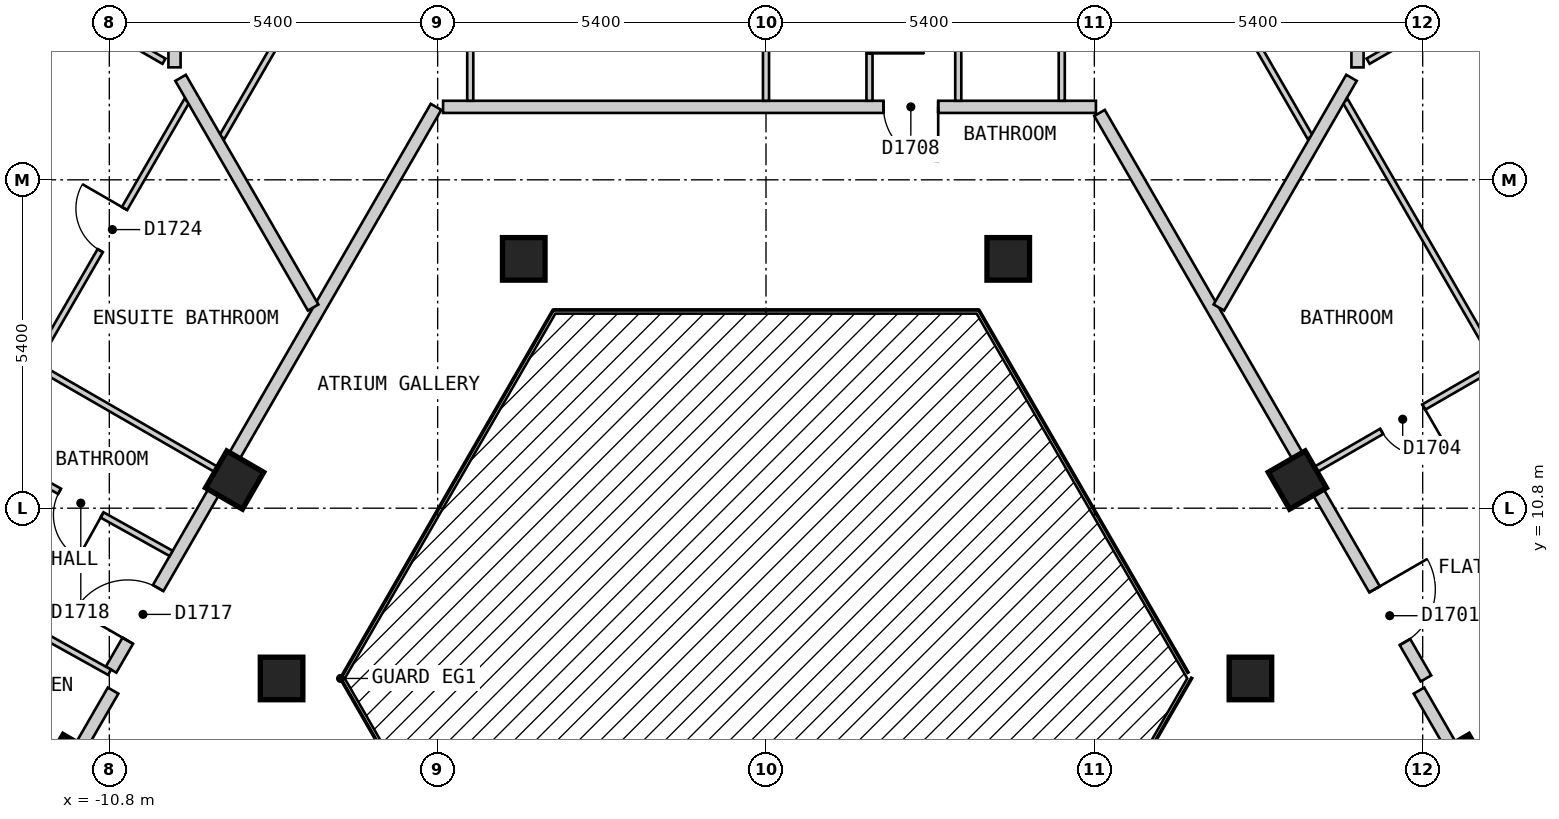
"""IFC4 building model, lengths in metres.
Left out: names, types, materials, properties, quantities, classifications, styles, units other than length and angle.
Written with IfcOpenShell. Run it as: python <this file> out.ifc"""

import sys

from ifc_helpers import new_model, si_unit, direction, frame, frame_2d, origin, origin_2d, place, context, subcontext, project, spatial, rectangle, extrude, element, fill, save


model = new_model("IFC4")
c1 = context("Model", 3, precision=1e-05, world=origin(), true_north=direction((0.0, 1.0)))
c2 = subcontext(c1, "Body", "Model", "MODEL_VIEW")
j1 = project(units=[si_unit("LENGTHUNIT", "METRE"), si_unit("PLANEANGLEUNIT", "RADIAN")], contexts=[c1])
p1 = place(None, origin())
s1 = spatial("IfcSite", under=j1, at=p1, CompositionType="ELEMENT")
p2 = place(p1, origin())
s2 = spatial("IfcBuilding", under=s1, at=p2, CompositionType="ELEMENT")
p3 = place(p2, frame((0.0, 0.0, 187.2)))
s3 = spatial("IfcBuildingStorey", under=s2, at=p3, CompositionType="ELEMENT", Elevation=187.2)
for number, where, z_axis, x_axis in (
    (1, (11.431, 6.6, 0.0), (0.0, 0.0, 1.0), (-0.5, 0.866, 0.0)),
    (2, (7.967, 8.0, 0.0), (0.0, 0.0, 1.0), (1.0, 0.0, 0.0)),
    (3, (8.739, 11.263, 0.0), (0.0, 0.0, 1.0), (-0.5, 0.866, 0.0)),
    (4, (3.984, 14.9, 0.0), (0.0, 0.0, 1.0), (1.0, 0.0, 0.0)),
    (5, (-3.984, 14.9, 0.0), (0.0, 0.0, 1.0), (1.0, 0.0, 0.0)),
    (6, (-8.739, 11.263, 0.0), (0.0, 0.0, 1.0), (-0.5, -0.866, 0.0)),
    (7, (-7.967, 8.0, 0.0), (0.0, 0.0, 1.0), (1.0, 0.0, 0.0)),
    (8, (-11.431, 6.6, 0.0), (0.0, 0.0, 1.0), (-0.5, -0.866, 0.0)),
):
    element("IfcColumn", number, at=place(p3, frame(where, z_axis=z_axis, x_axis=x_axis)), inside=s3, PredefinedType="COLUMN", context=c2, shape_type="SweptSolid", body=[
        extrude(rectangle(XDim=0.7, YDim=0.7, at=origin_2d()), origin(), (0.0, 0.0, 1.0), 3.0),
    ])
p4 = place(p3, frame((10.739, 7.8, 0.0), z_axis=(0.0, 0.0, 1.0), x_axis=(0.500023726918, -0.866011704609, 0.0)))
e9 = element("IfcWall", 9, at=p4, inside=s3, PredefinedType="PARTITIONING", context=c2, shape_type="SweptSolid", body=[
    extrude(rectangle(XDim=9.47, YDim=0.2, at=frame_2d((4.735, 0.0))), origin(), (0.0, 0.0, 1.0), 2.7),
])
p5 = place(p4, frame((8.168, 0.0, 0.0)))
e10 = element("IfcOpeningElement", 10, at=p5, cuts=e9, PredefinedType="OPENING", context=c2, shape_type="SweptSolid", body=[
    extrude(rectangle(XDim=1.0, YDim=2.1, at=frame_2d((0.5, 1.05))), frame((0.0, 0.11, 0.0), z_axis=(0.0, -1.0, 0.0), x_axis=(1.0, 0.0, 0.0)), (0.0, 0.0, 1.0), 0.22),
])
p6 = place(p3, frame((5.485, 17.3, 0.0), z_axis=(0.0, 0.0, 1.0), x_axis=(0.499965832213, -0.866045129667, 0.0)))
e11 = element("IfcWall", 11, at=p6, inside=s3, PredefinedType="PARTITIONING", context=c2, shape_type="SweptSolid", body=[
    extrude(rectangle(XDim=10.739, YDim=0.2, at=frame_2d((5.369, 0.0))), origin(), (0.0, 0.0, 1.0), 2.7),
])
p7 = place(p6, frame((9.047, 0.0, 0.0)))
e12 = element("IfcOpeningElement", 12, at=p7, cuts=e11, PredefinedType="OPENING", context=c2, shape_type="SweptSolid", body=[
    extrude(rectangle(XDim=1.0, YDim=2.1, at=frame_2d((0.5, 1.05))), frame((0.0, 0.11, 0.0), z_axis=(0.0, -1.0, 0.0), x_axis=(1.0, 0.0, 0.0)), (0.0, 0.0, 1.0), 0.22),
])
p8 = place(p3, frame((-5.311, 17.4, 0.0), z_axis=(0.0, 0.0, 1.0), x_axis=(1.0, 0.0, 0.0)))
e13 = element("IfcWall", 13, at=p8, inside=s3, PredefinedType="PARTITIONING", context=c2, shape_type="SweptSolid", body=[
    extrude(rectangle(XDim=10.737, YDim=0.2, at=frame_2d((5.369, 0.0))), origin(), (0.0, 0.0, 1.0), 2.7),
])
p9 = place(p8, frame((7.243, 0.0, 0.0)))
e14 = element("IfcOpeningElement", 14, at=p9, cuts=e13, PredefinedType="OPENING", context=c2, shape_type="SweptSolid", body=[
    extrude(rectangle(XDim=0.9, YDim=2.1, at=frame_2d((0.45, 1.05))), frame((0.0, 0.11, 0.0), z_axis=(0.0, -1.0, 0.0), x_axis=(1.0, 0.0, 0.0)), (0.0, 0.0, 1.0), 0.22),
])
p10 = place(p3, frame((-15.53, -0.501, 0.0), z_axis=(0.0, 0.0, 1.0), x_axis=(0.499952498232, 0.866052827206, 0.0)))
e15 = element("IfcWall", 15, at=p10, inside=s3, PredefinedType="PARTITIONING", context=c2, shape_type="SweptSolid", body=[
    extrude(rectangle(XDim=9.585, YDim=0.2, at=frame_2d((4.792, 0.0))), origin(), (0.0, 0.0, 1.0), 2.7),
])
p11 = place(p10, frame((0.525, 0.0, 0.0)))
e16 = element("IfcOpeningElement", 16, at=p11, cuts=e15, PredefinedType="OPENING", context=c2, shape_type="SweptSolid", body=[
    extrude(rectangle(XDim=1.0, YDim=2.1, at=frame_2d((0.5, 1.05))), frame((0.0, 0.11, 0.0), z_axis=(0.0, -1.0, 0.0), x_axis=(1.0, 0.0, 0.0)), (0.0, 0.0, 1.0), 0.22),
])
p12 = place(p3, frame((-10.771, 8.145, 0.0), z_axis=(0.0, 0.0, 1.0), x_axis=(0.500048075867, 0.865997645391, 0.0)))
e17 = element("IfcWall", 17, at=p12, inside=s3, PredefinedType="PARTITIONING", context=c2, shape_type="SweptSolid", body=[
    extrude(rectangle(XDim=10.687, YDim=0.2, at=frame_2d((5.344, 0.0))), origin(), (0.0, 0.0, 1.0), 2.7),
])
p13 = place(p12, frame((0.549, 0.0, 0.0)))
e18 = element("IfcOpeningElement", 18, at=p13, cuts=e17, PredefinedType="OPENING", context=c2, shape_type="SweptSolid", body=[
    extrude(rectangle(XDim=1.0, YDim=2.1, at=frame_2d((0.5, 1.05))), frame((0.0, 0.11, 0.0), z_axis=(0.0, -1.0, 0.0), x_axis=(1.0, 0.0, 0.0)), (0.0, 0.0, 1.0), 0.22),
])
p14 = place(p3, frame((7.073, 20.15, 0.0), z_axis=(0.0, 0.0, 1.0), x_axis=(0.499917691695, -0.866072919292, 0.0)))
e19 = element("IfcWall", 19, at=p14, inside=s3, PredefinedType="PARTITIONING", context=c2, shape_type="SweptSolid", body=[
    extrude(rectangle(XDim=3.753, YDim=0.1, at=frame_2d((1.876, 0.0))), origin(), (0.0, 0.0, 1.0), 2.7),
])
p15 = place(p14, frame((0.96, 0.0, 0.0)))
e20 = element("IfcOpeningElement", 20, at=p15, cuts=e19, PredefinedType="OPENING", context=c2, shape_type="SweptSolid", body=[
    extrude(rectangle(XDim=0.8, YDim=2.1, at=frame_2d((0.4, 1.05))), frame((0.0, 0.06, 0.0), z_axis=(0.0, -1.0, 0.0), x_axis=(1.0, 0.0, 0.0)), (0.0, 0.0, 1.0), 0.12),
])
p16 = place(p3, frame((9.526, 17.5, 0.0), z_axis=(0.0, 0.0, 1.0), x_axis=(0.500019134094, -0.866014356428, 0.0)))
e21 = element("IfcWall", 21, at=p16, inside=s3, PredefinedType="PARTITIONING", context=c2, shape_type="SweptSolid", body=[
    extrude(rectangle(XDim=10.97, YDim=0.1, at=frame_2d((5.485, 0.0))), origin(), (0.0, 0.0, 1.0), 2.7),
])
p17 = place(p16, frame((7.25, 0.0, 0.0)))
e22 = element("IfcOpeningElement", 22, at=p17, cuts=e21, PredefinedType="OPENING", context=c2, shape_type="SweptSolid", body=[
    extrude(rectangle(XDim=0.9, YDim=2.1, at=frame_2d((0.45, 1.05))), frame((0.0, 0.06, 0.0), z_axis=(0.0, -1.0, 0.0), x_axis=(1.0, 0.0, 0.0)), (0.0, 0.0, 1.0), 0.12),
])
p18 = place(p3, frame((0.0, 20.17, 0.0), z_axis=(0.0, 0.0, 1.0), x_axis=(0.0, -1.0, 0.0)))
e23 = element("IfcWall", 23, at=p18, inside=s3, PredefinedType="PARTITIONING", context=c2, shape_type="SweptSolid", body=[
    extrude(rectangle(XDim=2.67, YDim=0.1, at=frame_2d((1.335, 0.0))), origin(), (0.0, 0.0, 1.0), 2.7),
])
p19 = place(p3, frame((4.864, 20.03, 0.0), z_axis=(0.0, 0.0, 1.0), x_axis=(0.0, -1.0, 0.0)))
e24 = element("IfcWall", 24, at=p19, inside=s3, PredefinedType="PARTITIONING", context=c2, shape_type="SweptSolid", body=[
    extrude(rectangle(XDim=2.53, YDim=0.1, at=frame_2d((1.265, 0.0))), origin(), (0.0, 0.0, 1.0), 2.7),
])
p20 = place(p3, frame((-12.798, 11.735, 0.0), z_axis=(0.0, 0.0, 1.0), x_axis=(0.873649600774, -0.486555623816, 0.0)))
e25 = element("IfcWall", 25, at=p20, inside=s3, PredefinedType="PARTITIONING", context=c2, shape_type="SweptSolid", body=[
    extrude(rectangle(XDim=3.451, YDim=0.1, at=frame_2d((1.726, 0.0))), origin(), (0.0, 0.0, 1.0), 2.7),
])
p21 = place(p20, frame((1.35, 0.0, 0.0)))
e26 = element("IfcOpeningElement", 26, at=p21, cuts=e25, PredefinedType="OPENING", context=c2, shape_type="SweptSolid", body=[
    extrude(rectangle(XDim=0.8, YDim=2.1, at=frame_2d((0.4, 1.05))), frame((0.0, 0.06, 0.0), z_axis=(0.0, -1.0, 0.0), x_axis=(1.0, 0.0, 0.0)), (0.0, 0.0, 1.0), 0.12),
])
p22 = place(p3, frame((-13.898, 9.829, 0.0), z_axis=(0.0, 0.0, 1.0), x_axis=(0.873715787747, -0.486436760784, 0.0)))
e27 = element("IfcWall", 27, at=p22, inside=s3, PredefinedType="PARTITIONING", context=c2, shape_type="SweptSolid", body=[
    extrude(rectangle(XDim=3.55, YDim=0.1, at=frame_2d((1.775, 0.0))), origin(), (0.0, 0.0, 1.0), 2.7),
])
p23 = place(p22, frame((1.3, 0.0, 0.0)))
e28 = element("IfcOpeningElement", 28, at=p23, cuts=e27, PredefinedType="OPENING", context=c2, shape_type="SweptSolid", body=[
    extrude(rectangle(XDim=0.9, YDim=2.1, at=frame_2d((0.45, 1.05))), frame((0.0, 0.06, 0.0), z_axis=(0.0, -1.0, 0.0), x_axis=(1.0, 0.0, 0.0)), (0.0, 0.0, 1.0), 0.12),
])
p24 = place(p3, frame((-14.679, 8.475, 0.0), z_axis=(0.0, 0.0, 1.0), x_axis=(0.865995104784, -0.500052475737, 0.0)))
e29 = element("IfcWall", 29, at=p24, inside=s3, PredefinedType="PARTITIONING", context=c2, shape_type="SweptSolid", body=[
    extrude(rectangle(XDim=3.65, YDim=0.1, at=frame_2d((1.825, 0.0))), origin(), (0.0, 0.0, 1.0), 2.7),
])
p25 = place(p3, frame((-14.794, 20.975, 0.0), z_axis=(0.0, 0.0, 1.0), x_axis=(0.866011447264, -0.500024172624, 0.0)))
e30 = element("IfcWall", 30, at=p25, inside=s3, PredefinedType="PARTITIONING", context=c2, shape_type="SweptSolid", body=[
    extrude(rectangle(XDim=5.65, YDim=0.1, at=frame_2d((2.825, 0.0))), origin(), (0.0, 0.0, 1.0), 2.7),
])
p26 = place(p25, frame((2.475, 0.0, 0.0)))
e31 = element("IfcOpeningElement", 31, at=p26, cuts=e30, PredefinedType="OPENING", context=c2, shape_type="SweptSolid", body=[
    extrude(rectangle(XDim=0.9, YDim=2.1, at=frame_2d((0.45, 1.05))), frame((0.0, 0.06, 0.0), z_axis=(0.0, -1.0, 0.0), x_axis=(1.0, 0.0, 0.0)), (0.0, 0.0, 1.0), 0.12),
])
p27 = place(p3, frame((-8.949, 16.9, 0.0), z_axis=(0.0, 0.0, 1.0), x_axis=(0.499949850951, 0.866054355415, 0.0)))
e32 = element("IfcWall", 32, at=p27, inside=s3, PredefinedType="PARTITIONING", context=c2, shape_type="SweptSolid", body=[
    extrude(rectangle(XDim=3.811, YDim=0.1, at=frame_2d((1.905, 0.0))), origin(), (0.0, 0.0, 1.0), 2.7),
])
p28 = place(p27, frame((1.992, 0.0, 0.0)))
e33 = element("IfcOpeningElement", 33, at=p28, cuts=e32, PredefinedType="OPENING", context=c2, shape_type="SweptSolid", body=[
    extrude(rectangle(XDim=0.8, YDim=2.1, at=frame_2d((0.4, 1.05))), frame((0.0, 0.06, 0.0), z_axis=(0.0, -1.0, 0.0), x_axis=(1.0, 0.0, 0.0)), (0.0, 0.0, 1.0), 0.12),
])
p29 = place(p3, frame((-15.012, 8.0, 0.0), z_axis=(0.0, 0.0, 1.0), x_axis=(0.500047346826, 0.865998066356, 0.0)))
e34 = element("IfcWall", 34, at=p29, inside=s3, PredefinedType="PARTITIONING", context=c2, shape_type="SweptSolid", body=[
    extrude(rectangle(XDim=10.971, YDim=0.1, at=frame_2d((5.486, 0.0))), origin(), (0.0, 0.0, 1.0), 2.7),
])
p30 = place(p29, frame((2.791, 0.0, 0.0)))
e35 = element("IfcOpeningElement", 35, at=p30, cuts=e34, PredefinedType="OPENING", context=c2, shape_type="SweptSolid", body=[
    extrude(rectangle(XDim=0.9, YDim=2.1, at=frame_2d((0.45, 1.05))), frame((0.0, 0.06, 0.0), z_axis=(0.0, -1.0, 0.0), x_axis=(1.0, 0.0, 0.0)), (0.0, 0.0, 1.0), 0.12),
])
p31 = place(p29, frame((8.124, 0.0, 0.0)))
e36 = element("IfcOpeningElement", 36, at=p31, cuts=e34, PredefinedType="OPENING", context=c2, shape_type="SweptSolid", body=[
    extrude(rectangle(XDim=0.8, YDim=2.1, at=frame_2d((0.4, 1.05))), frame((0.0, 0.06, 0.0), z_axis=(0.0, -1.0, 0.0), x_axis=(1.0, 0.0, 0.0)), (0.0, 0.0, 1.0), 0.12),
])
p32 = place(p3, frame((3.162, 17.5, 0.0), z_axis=(0.0, 0.0, 1.0), x_axis=(0.0, 1.0, 0.0)))
e37 = element("IfcWall", 37, at=p32, inside=s3, PredefinedType="PARTITIONING", context=c2, shape_type="SweptSolid", body=[
    extrude(rectangle(XDim=2.51, YDim=0.1, at=frame_2d((1.255, 0.0))), origin(), (0.0, 0.0, 1.0), 2.7),
])
p33 = place(p32, frame((0.83, 0.0, 0.0)))
e38 = element("IfcOpeningElement", 38, at=p33, cuts=e37, PredefinedType="OPENING", context=c2, shape_type="SweptSolid", body=[
    extrude(rectangle(XDim=0.8, YDim=2.1, at=frame_2d((0.4, 1.05))), frame((0.0, 0.06, 0.0), z_axis=(0.0, -1.0, 0.0), x_axis=(1.0, 0.0, 0.0)), (0.0, 0.0, 1.0), 0.12),
])
p34 = place(p3, frame((1.702, 17.5, 0.0), z_axis=(0.0, 0.0, 1.0), x_axis=(0.0, 1.0, 0.0)))
e39 = element("IfcWall", 39, at=p34, inside=s3, PredefinedType="PARTITIONING", context=c2, shape_type="SweptSolid", body=[
    extrude(rectangle(XDim=2.559, YDim=0.1, at=frame_2d((1.28, 0.0))), origin(), (0.0, 0.0, 1.0), 2.7),
])
p35 = place(p34, frame((0.78, 0.0, 0.0)))
e40 = element("IfcOpeningElement", 40, at=p35, cuts=e39, PredefinedType="OPENING", context=c2, shape_type="SweptSolid", body=[
    extrude(rectangle(XDim=0.9, YDim=2.1, at=frame_2d((0.45, 1.05))), frame((0.0, 0.06, 0.0), z_axis=(0.0, -1.0, 0.0), x_axis=(1.0, 0.0, 0.0)), (0.0, 0.0, 1.0), 0.12),
])
p36 = place(p3, frame((-4.864, 17.5, 0.0), z_axis=(0.0, 0.0, 1.0), x_axis=(0.0, 1.0, 0.0)))
e41 = element("IfcWall", 41, at=p36, inside=s3, PredefinedType="PARTITIONING", context=c2, shape_type="SweptSolid", body=[
    extrude(rectangle(XDim=2.7, YDim=0.1, at=frame_2d((1.35, 0.0))), origin(), (0.0, 0.0, 1.0), 2.7),
])
p37 = place(p3, frame((11.518, 6.65, 0.0), z_axis=(0.0, 0.0, 1.0), x_axis=(0.865984470368, 0.500070892056, 0.0)))
e42 = element("IfcWall", 42, at=p37, inside=s3, PredefinedType="PARTITIONING", context=c2, shape_type="SweptSolid", body=[
    extrude(rectangle(XDim=3.7, YDim=0.1, at=frame_2d((1.85, 0.0))), origin(), (0.0, 0.0, 1.0), 2.7),
])
p38 = place(p37, frame((1.35, 0.0, 0.0)))
e43 = element("IfcOpeningElement", 43, at=p38, cuts=e42, PredefinedType="OPENING", context=c2, shape_type="SweptSolid", body=[
    extrude(rectangle(XDim=0.9, YDim=2.1, at=frame_2d((0.45, 1.05))), frame((0.0, 0.06, 0.0), z_axis=(0.0, -1.0, 0.0), x_axis=(1.0, 0.0, 0.0)), (0.0, 0.0, 1.0), 0.12),
])
p39 = place(p3, frame((8.999, 11.413, 0.0), z_axis=(0.0, 0.0, 1.0), x_axis=(0.866019471182, 0.500010275428, 0.0)))
e44 = element("IfcWall", 44, at=p39, inside=s3, PredefinedType="PARTITIONING", context=c2, shape_type="SweptSolid", body=[
    extrude(rectangle(XDim=3.5, YDim=0.1, at=frame_2d((1.75, 0.0))), origin(), (0.0, 0.0, 1.0), 2.7),
])
p40 = place(p39, frame((1.3, 0.0, 0.0)))
e45 = element("IfcOpeningElement", 45, at=p40, cuts=e44, PredefinedType="OPENING", context=c2, shape_type="SweptSolid", body=[
    extrude(rectangle(XDim=0.8, YDim=2.1, at=frame_2d((0.4, 1.05))), frame((0.0, 0.06, 0.0), z_axis=(0.0, -1.0, 0.0), x_axis=(1.0, 0.0, 0.0)), (0.0, 0.0, 1.0), 0.12),
])
p41 = place(p3, frame((9.902, 18.151, 0.0), z_axis=(0.0, 0.0, 1.0), x_axis=(0.866032278734, 0.499988092049, 0.0)))
e46 = element("IfcWall", 46, at=p41, inside=s3, PredefinedType="PARTITIONING", context=c2, shape_type="SweptSolid", body=[
    extrude(rectangle(XDim=5.649, YDim=0.1, at=frame_2d((2.824, 0.0))), origin(), (0.0, 0.0, 1.0), 2.7),
])
p42 = place(p41, frame((2.274, 0.0, 0.0)))
e47 = element("IfcOpeningElement", 47, at=p42, cuts=e46, PredefinedType="OPENING", context=c2, shape_type="SweptSolid", body=[
    extrude(rectangle(XDim=0.9, YDim=2.1, at=frame_2d((0.45, 1.05))), frame((0.0, 0.06, 0.0), z_axis=(0.0, -1.0, 0.0), x_axis=(1.0, 0.0, 0.0)), (0.0, 0.0, 1.0), 0.12),
])
p43 = place(p3, frame((-9.628, 17.877, 0.0), z_axis=(0.0, 0.0, 1.0), x_axis=(0.499890461358, -0.866088636713, 0.0)))
e48 = element("IfcWall", 48, at=p43, inside=s3, PredefinedType="PARTITIONING", context=c2, shape_type="SweptSolid", body=[
    extrude(rectangle(XDim=4.361, YDim=0.2, at=frame_2d((2.18, 0.0))), origin(), (0.0, 0.0, 1.0), 2.7),
])
p44 = place(p3, frame((7.448, 14.1, 0.0), z_axis=(0.0, 0.0, 1.0), x_axis=(0.499961462843, 0.866047652079, 0.0)))
e49 = element("IfcWall", 49, at=p44, inside=s3, PredefinedType="PARTITIONING", context=c2, shape_type="SweptSolid", body=[
    extrude(rectangle(XDim=4.362, YDim=0.2, at=frame_2d((2.181, 0.0))), origin(), (0.0, 0.0, 1.0), 2.7),
])
p45 = place(p3, frame((9.728, 18.049, 0.0), z_axis=(0.0, 0.0, 1.0), x_axis=(0.0, 1.0, 0.0)))
e50 = element("IfcWall", 50, at=p45, inside=s3, PredefinedType="PARTITIONING", context=c2, shape_type="SweptSolid", body=[
    extrude(rectangle(XDim=5.851, YDim=0.2, at=frame_2d((2.925, 0.0))), origin(), (0.0, 0.0, 1.0), 2.7),
])
p46 = place(p3, frame((-9.728, 18.05, 0.0), z_axis=(0.0, 0.0, 1.0), x_axis=(0.0, 1.0, 0.0)))
e51 = element("IfcWall", 51, at=p46, inside=s3, PredefinedType="PARTITIONING", context=c2, shape_type="SweptSolid", body=[
    extrude(rectangle(XDim=5.85, YDim=0.2, at=frame_2d((2.925, 0.0))), origin(), (0.0, 0.0, 1.0), 2.7),
])
p47 = place(p3, frame((-12.031, 13.163, 0.0), z_axis=(0.0, 0.0, 1.0), x_axis=(0.86608920467, -0.499889477339, 0.0)))
e52 = element("IfcWall", 52, at=p47, inside=s3, PredefinedType="PARTITIONING", context=c2, shape_type="SweptSolid", body=[
    extrude(rectangle(XDim=3.501, YDim=0.1, at=frame_2d((1.75, 0.0))), origin(), (0.0, 0.0, 1.0), 2.7),
])
p48 = place(p7, origin())
e53 = element("IfcDoor", 53, at=p48, inside=s3, OperationType="SINGLE_SWING_LEFT", PredefinedType="DOOR", context=c2, shape_type="SweptSolid", body=[
    extrude(rectangle(XDim=1.0, YDim=2.1, at=frame_2d((0.5, 1.05))), frame((0.0, 0.025, 0.0), z_axis=(0.0, -1.0, 0.0), x_axis=(1.0, 0.0, 0.0)), (0.0, 0.0, 1.0), 0.05),
])
fill(e12, e53)
p49 = place(p40, origin())
e54 = element("IfcDoor", 54, at=p49, inside=s3, OperationType="SINGLE_SWING_RIGHT", PredefinedType="DOOR", context=c2, shape_type="SweptSolid", body=[
    extrude(rectangle(XDim=0.8, YDim=2.1, at=frame_2d((0.4, 1.05))), frame((0.0, 0.025, 0.0), z_axis=(0.0, -1.0, 0.0), x_axis=(1.0, 0.0, 0.0)), (0.0, 0.0, 1.0), 0.05),
])
fill(e45, e54)
p50 = place(p9, origin())
e55 = element("IfcDoor", 55, at=p50, inside=s3, OperationType="SINGLE_SWING_RIGHT", PredefinedType="DOOR", context=c2, shape_type="SweptSolid", body=[
    extrude(rectangle(XDim=0.9, YDim=2.1, at=frame_2d((0.45, 1.05))), frame((0.0, 0.025, 0.0), z_axis=(0.0, -1.0, 0.0), x_axis=(1.0, 0.0, 0.0)), (0.0, 0.0, 1.0), 0.05),
])
fill(e14, e55)
p51 = place(p35, origin())
e56 = element("IfcDoor", 56, at=p51, inside=s3, OperationType="SINGLE_SWING_LEFT", PredefinedType="DOOR", context=c2, shape_type="SweptSolid", body=[
    extrude(rectangle(XDim=0.9, YDim=2.1, at=frame_2d((0.45, 1.05))), frame((0.0, 0.025, 0.0), z_axis=(0.0, -1.0, 0.0), x_axis=(1.0, 0.0, 0.0)), (0.0, 0.0, 1.0), 0.05),
])
fill(e40, e56)
p52 = place(p13, origin())
e57 = element("IfcDoor", 57, at=p52, inside=s3, OperationType="SINGLE_SWING_LEFT", PredefinedType="DOOR", context=c2, shape_type="SweptSolid", body=[
    extrude(rectangle(XDim=1.0, YDim=2.1, at=frame_2d((0.5, 1.05))), frame((0.0, 0.025, 0.0), z_axis=(0.0, -1.0, 0.0), x_axis=(1.0, 0.0, 0.0)), (0.0, 0.0, 1.0), 0.05),
])
fill(e18, e57)
p53 = place(p21, origin())
e58 = element("IfcDoor", 58, at=p53, inside=s3, OperationType="SINGLE_SWING_RIGHT", PredefinedType="DOOR", context=c2, shape_type="SweptSolid", body=[
    extrude(rectangle(XDim=0.8, YDim=2.1, at=frame_2d((0.4, 1.05))), frame((0.0, 0.025, 0.0), z_axis=(0.0, -1.0, 0.0), x_axis=(1.0, 0.0, 0.0)), (0.0, 0.0, 1.0), 0.05),
])
fill(e26, e58)
p54 = place(p31, origin())
e59 = element("IfcDoor", 59, at=p54, inside=s3, OperationType="SINGLE_SWING_RIGHT", PredefinedType="DOOR", context=c2, shape_type="SweptSolid", body=[
    extrude(rectangle(XDim=0.8, YDim=2.1, at=frame_2d((0.4, 1.05))), frame((0.0, 0.025, 0.0), z_axis=(0.0, -1.0, 0.0), x_axis=(1.0, 0.0, 0.0)), (0.0, 0.0, 1.0), 0.05),
])
fill(e36, e59)
save(model, sys.argv[1])
